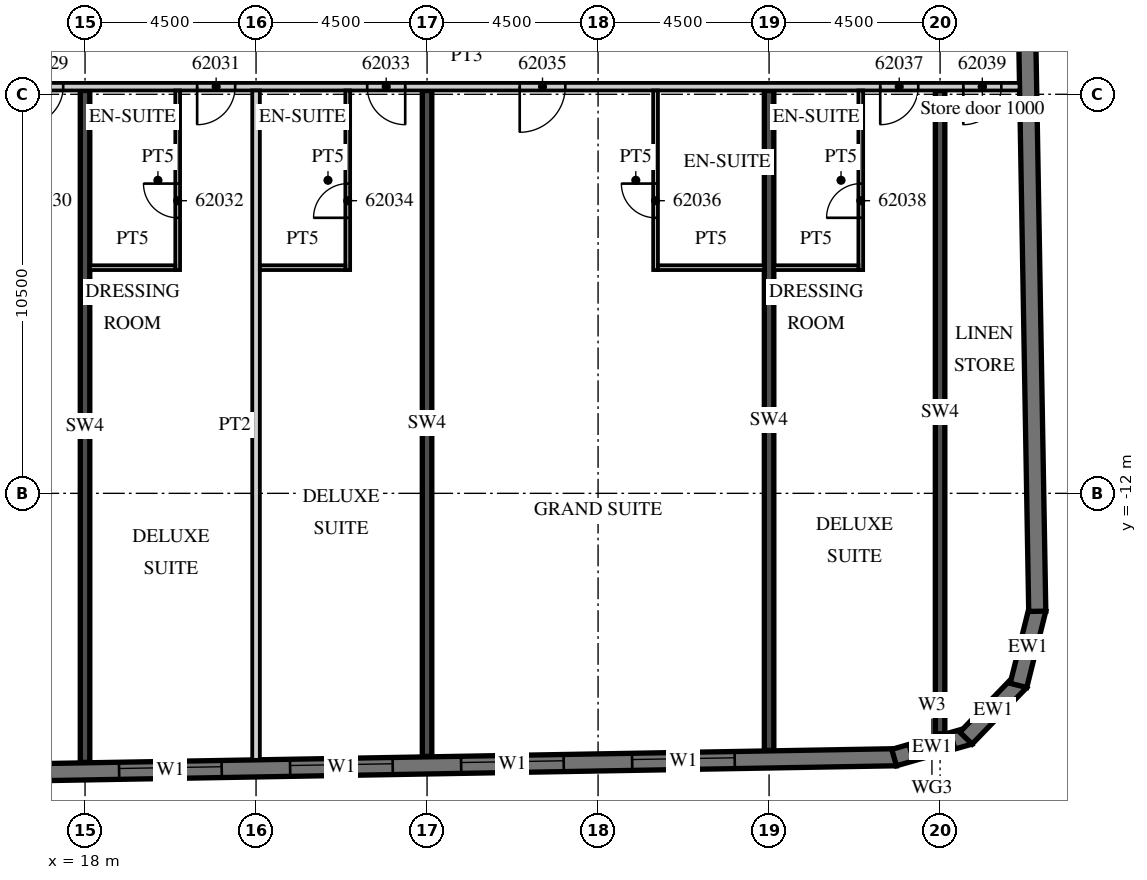
"""IFC4 building model, lengths in metres.
Left out: names, types, materials, properties, quantities, classifications, styles, units other than length and angle.
Written with IfcOpenShell. Run it as: python <this file> out.ifc"""

import sys

from ifc_helpers import new_model, si_unit, direction, frame, frame_2d, origin, place, context, subcontext, project, spatial, polyline, rectangle, outline, extrude, element, fill, save


model = new_model("IFC4")
c1 = context("Model", 3, precision=1e-05, world=origin(), true_north=direction((0.0, 1.0)))
c2 = subcontext(c1, "Body", "Model", "MODEL_VIEW")
j1 = project(units=[si_unit("LENGTHUNIT", "METRE"), si_unit("PLANEANGLEUNIT", "RADIAN")], contexts=[c1])
p1 = place(None, origin())
s1 = spatial("IfcSite", under=j1, at=p1, CompositionType="ELEMENT")
p2 = place(p1, origin())
s2 = spatial("IfcBuilding", under=s1, at=p2, CompositionType="ELEMENT")
p3 = place(p2, frame((0.0, 0.0, 250.7)))
s3 = spatial("IfcBuildingStorey", under=s2, at=p3, CompositionType="ELEMENT", Elevation=250.7)
p4 = place(p3, frame((18.0, -19.079, 0.0), z_axis=(0.0, 0.0, 1.0), x_axis=(0.0, 1.0, 0.0)))
e1 = element("IfcWall", 1, at=p4, inside=s3, PredefinedType="SHEAR", context=c2, shape_type="SweptSolid", body=[
    extrude(rectangle(XDim=17.679, YDim=0.25, at=frame_2d((8.84, 0.0))), origin(), (0.0, 0.0, 1.0), 3.3),
])
p5 = place(p3, frame((27.0, -18.922, 0.0), z_axis=(0.0, 0.0, 1.0), x_axis=(0.0, 1.0, 0.0)))
e2 = element("IfcWall", 2, at=p5, inside=s3, PredefinedType="SHEAR", context=c2, shape_type="SweptSolid", body=[
    extrude(rectangle(XDim=17.522, YDim=0.25, at=frame_2d((8.761, 0.0))), origin(), (0.0, 0.0, 1.0), 3.3),
])
p6 = place(p3, frame((36.0, -18.765, 0.0), z_axis=(0.0, 0.0, 1.0), x_axis=(0.0, 1.0, 0.0)))
e3 = element("IfcWall", 3, at=p6, inside=s3, PredefinedType="SHEAR", context=c2, shape_type="SweptSolid", body=[
    extrude(rectangle(XDim=17.365, YDim=0.25, at=frame_2d((8.683, 0.0))), origin(), (0.0, 0.0, 1.0), 3.3),
])
p7 = place(p3, frame((40.5, -18.325, 0.0), z_axis=(0.0, 0.0, 1.0), x_axis=(0.0, 1.0, 0.0)))
e4 = element("IfcWall", 4, at=p7, inside=s3, PredefinedType="SHEAR", context=c2, shape_type="SweptSolid", body=[
    extrude(rectangle(XDim=16.925, YDim=0.25, at=frame_2d((8.463, 0.0))), origin(), (0.0, 0.0, 1.0), 3.3),
])
p8 = place(p3, frame((-13.504, -19.866, 0.0), z_axis=(0.0, 0.0, 1.0), x_axis=(0.999847672978, 0.017453676992, 0.0)))
e5 = element("IfcWall", 5, at=p8, inside=s3, PredefinedType="SOLIDWALL", context=c2, shape_type="SweptSolid", body=[
    extrude(rectangle(XDim=52.86, YDim=0.45, at=frame_2d((26.43, 0.0))), origin(), (0.0, 0.0, 1.0), 3.02),
])
p9 = place(p8, frame((0.9, 0.0, 0.45)))
e6 = element("IfcOpeningElement", 6, at=p9, cuts=e5, PredefinedType="OPENING", context=c2, shape_type="SweptSolid", body=[
    extrude(rectangle(XDim=2.7, YDim=2.25, at=frame_2d((1.35, 1.125))), frame((0.0, 0.235, 0.0), z_axis=(0.0, -1.0, 0.0), x_axis=(1.0, 0.0, 0.0)), (0.0, 0.0, 1.0), 0.47),
])
p10 = place(p8, frame((5.401, 0.0, 0.45)))
e7 = element("IfcOpeningElement", 7, at=p10, cuts=e5, PredefinedType="OPENING", context=c2, shape_type="SweptSolid", body=[
    extrude(rectangle(XDim=2.7, YDim=2.25, at=frame_2d((1.35, 1.125))), frame((0.0, 0.235, 0.0), z_axis=(0.0, -1.0, 0.0), x_axis=(1.0, 0.0, 0.0)), (0.0, 0.0, 1.0), 0.47),
])
p11 = place(p8, frame((9.902, 0.0, 0.45)))
e8 = element("IfcOpeningElement", 8, at=p11, cuts=e5, PredefinedType="OPENING", context=c2, shape_type="SweptSolid", body=[
    extrude(rectangle(XDim=2.7, YDim=2.25, at=frame_2d((1.35, 1.125))), frame((0.0, 0.235, 0.0), z_axis=(0.0, -1.0, 0.0), x_axis=(1.0, 0.0, 0.0)), (0.0, 0.0, 1.0), 0.47),
])
p12 = place(p8, frame((14.402, 0.0, 0.45)))
e9 = element("IfcOpeningElement", 9, at=p12, cuts=e5, PredefinedType="OPENING", context=c2, shape_type="SweptSolid", body=[
    extrude(rectangle(XDim=2.7, YDim=2.25, at=frame_2d((1.35, 1.125))), frame((0.0, 0.235, 0.0), z_axis=(0.0, -1.0, 0.0), x_axis=(1.0, 0.0, 0.0)), (0.0, 0.0, 1.0), 0.47),
])
p13 = place(p8, frame((18.903, 0.0, 0.45)))
e10 = element("IfcOpeningElement", 10, at=p13, cuts=e5, PredefinedType="OPENING", context=c2, shape_type="SweptSolid", body=[
    extrude(rectangle(XDim=2.7, YDim=2.25, at=frame_2d((1.35, 1.125))), frame((0.0, 0.235, 0.0), z_axis=(0.0, -1.0, 0.0), x_axis=(1.0, 0.0, 0.0)), (0.0, 0.0, 1.0), 0.47),
])
p14 = place(p8, frame((23.404, 0.0, 0.45)))
e11 = element("IfcOpeningElement", 11, at=p14, cuts=e5, PredefinedType="OPENING", context=c2, shape_type="SweptSolid", body=[
    extrude(rectangle(XDim=2.7, YDim=2.25, at=frame_2d((1.35, 1.125))), frame((0.0, 0.235, 0.0), z_axis=(0.0, -1.0, 0.0), x_axis=(1.0, 0.0, 0.0)), (0.0, 0.0, 1.0), 0.47),
])
p15 = place(p8, frame((27.904, 0.0, 0.45)))
e12 = element("IfcOpeningElement", 12, at=p15, cuts=e5, PredefinedType="OPENING", context=c2, shape_type="SweptSolid", body=[
    extrude(rectangle(XDim=2.7, YDim=2.25, at=frame_2d((1.35, 1.125))), frame((0.0, 0.235, 0.0), z_axis=(0.0, -1.0, 0.0), x_axis=(1.0, 0.0, 0.0)), (0.0, 0.0, 1.0), 0.47),
])
p16 = place(p8, frame((32.405, 0.0, 0.45)))
e13 = element("IfcOpeningElement", 13, at=p16, cuts=e5, PredefinedType="OPENING", context=c2, shape_type="SweptSolid", body=[
    extrude(rectangle(XDim=2.7, YDim=2.25, at=frame_2d((1.35, 1.125))), frame((0.0, 0.235, 0.0), z_axis=(0.0, -1.0, 0.0), x_axis=(1.0, 0.0, 0.0)), (0.0, 0.0, 1.0), 0.47),
])
p17 = place(p8, frame((36.906, 0.0, 0.45)))
e14 = element("IfcOpeningElement", 14, at=p17, cuts=e5, PredefinedType="OPENING", context=c2, shape_type="SweptSolid", body=[
    extrude(rectangle(XDim=2.7, YDim=2.25, at=frame_2d((1.35, 1.125))), frame((0.0, 0.235, 0.0), z_axis=(0.0, -1.0, 0.0), x_axis=(1.0, 0.0, 0.0)), (0.0, 0.0, 1.0), 0.47),
])
p18 = place(p8, frame((41.406, 0.0, 0.45)))
e15 = element("IfcOpeningElement", 15, at=p18, cuts=e5, PredefinedType="OPENING", context=c2, shape_type="SweptSolid", body=[
    extrude(rectangle(XDim=2.7, YDim=2.25, at=frame_2d((1.35, 1.125))), frame((0.0, 0.235, 0.0), z_axis=(0.0, -1.0, 0.0), x_axis=(1.0, 0.0, 0.0)), (0.0, 0.0, 1.0), 0.47),
])
p19 = place(p8, frame((45.907, 0.0, 0.45)))
e16 = element("IfcOpeningElement", 16, at=p19, cuts=e5, PredefinedType="OPENING", context=c2, shape_type="SweptSolid", body=[
    extrude(rectangle(XDim=2.7, YDim=2.25, at=frame_2d((1.35, 1.125))), frame((0.0, 0.235, 0.0), z_axis=(0.0, -1.0, 0.0), x_axis=(1.0, 0.0, 0.0)), (0.0, 0.0, 1.0), 0.47),
])
p20 = place(p3, frame((39.29, -18.952, 0.0), z_axis=(0.0, 0.0, 1.0), x_axis=(0.961247584925, 0.275686562016, 0.0)))
e17 = element("IfcWall", 17, at=p20, inside=s3, PredefinedType="SOLIDWALL", context=c2, shape_type="SweptSolid", body=[
    extrude(outline(polyline([(0.0, -0.225), (2.071, -0.225), (1.95, 0.225), (0.121, 0.225), (0.0, -0.225)])), origin(), (0.0, 0.0, 1.0), 3.02),
])
p21 = place(p20, frame((0.435, 0.0, 0.45)))
e18 = element("IfcOpeningElement", 18, at=p21, cuts=e17, PredefinedType="OPENING", context=c2, shape_type="SweptSolid", body=[
    extrude(rectangle(XDim=1.2, YDim=2.25, at=frame_2d((0.6, 1.125))), frame((0.0, 0.235, 0.0), z_axis=(0.0, -1.0, 0.0), x_axis=(1.0, 0.0, 0.0)), (0.0, 0.0, 1.0), 0.47),
])
p22 = place(p3, frame((41.181, -18.442, 0.0), z_axis=(0.0, 0.0, 1.0), x_axis=(0.694678672846, 0.719320193998, 0.0)))
e19 = element("IfcWall", 19, at=p22, inside=s3, PredefinedType="SOLIDWALL", context=c2, shape_type="SweptSolid", body=[
    extrude(outline(polyline([(0.0, -0.225), (2.071, -0.225), (1.95, 0.225), (0.121, 0.225), (0.0, -0.225)])), origin(), (0.0, 0.0, 1.0), 3.02),
])
p23 = place(p3, frame((42.563, -17.054, 0.0), z_axis=(0.0, 0.0, 1.0), x_axis=(0.241841950319, 0.970315655375, 0.0)))
e20 = element("IfcWall", 20, at=p23, inside=s3, PredefinedType="SOLIDWALL", context=c2, shape_type="SweptSolid", body=[
    extrude(outline(polyline([(0.0, -0.225), (2.071, -0.225), (1.95, 0.225), (0.121, 0.225), (0.0, -0.225)])), origin(), (0.0, 0.0, 1.0), 3.02),
])
p24 = place(p3, frame((43.057, -15.103, 0.0), z_axis=(0.0, 0.0, 1.0), x_axis=(-0.017452408953, 0.999847695112, 0.0)))
e21 = element("IfcWall", 21, at=p24, inside=s3, PredefinedType="SOLIDWALL", context=c2, shape_type="SweptSolid", body=[
    extrude(rectangle(XDim=33.0, YDim=0.45, at=frame_2d((16.5, 0.0))), origin(), (0.0, 0.0, 1.0), 3.02),
])
p25 = place(p3, frame((13.5, -1.3, 0.0), z_axis=(0.0, 0.0, 1.0), x_axis=(1.0, 0.0, 0.0)))
e22 = element("IfcWall", 22, at=p25, inside=s3, PredefinedType="PARTITIONING", context=c2, shape_type="SweptSolid", body=[
    extrude(rectangle(XDim=29.091, YDim=0.2, at=frame_2d((14.545, 0.0))), origin(), (0.0, 0.0, 1.0), 3.02),
])
p26 = place(p25, frame((2.925, 0.0, 0.0)))
e23 = element("IfcOpeningElement", 23, at=p26, cuts=e22, PredefinedType="OPENING", context=c2, shape_type="SweptSolid", body=[
    extrude(rectangle(XDim=1.0, YDim=2.1, at=frame_2d((0.5, 1.05))), frame((0.0, 0.11, 0.0), z_axis=(0.0, -1.0, 0.0), x_axis=(1.0, 0.0, 0.0)), (0.0, 0.0, 1.0), 0.22),
])
p27 = place(p25, frame((7.45, 0.0, 0.0)))
e24 = element("IfcOpeningElement", 24, at=p27, cuts=e22, PredefinedType="OPENING", context=c2, shape_type="SweptSolid", body=[
    extrude(rectangle(XDim=1.0, YDim=2.1, at=frame_2d((0.5, 1.05))), frame((0.0, 0.11, 0.0), z_axis=(0.0, -1.0, 0.0), x_axis=(1.0, 0.0, 0.0)), (0.0, 0.0, 1.0), 0.22),
])
p28 = place(p25, frame((11.925, 0.0, 0.0)))
e25 = element("IfcOpeningElement", 25, at=p28, cuts=e22, PredefinedType="OPENING", context=c2, shape_type="SweptSolid", body=[
    extrude(rectangle(XDim=1.0, YDim=2.1, at=frame_2d((0.5, 1.05))), frame((0.0, 0.11, 0.0), z_axis=(0.0, -1.0, 0.0), x_axis=(1.0, 0.0, 0.0)), (0.0, 0.0, 1.0), 0.22),
])
p29 = place(p25, frame((15.938, 0.0, 0.0)))
e26 = element("IfcOpeningElement", 26, at=p29, cuts=e22, PredefinedType="OPENING", context=c2, shape_type="SweptSolid", body=[
    extrude(rectangle(XDim=1.2, YDim=2.1, at=frame_2d((0.6, 1.05))), frame((0.0, 0.11, 0.0), z_axis=(0.0, -1.0, 0.0), x_axis=(1.0, 0.0, 0.0)), (0.0, 0.0, 1.0), 0.22),
])
p30 = place(p25, frame((25.425, 0.0, 0.0)))
e27 = element("IfcOpeningElement", 27, at=p30, cuts=e22, PredefinedType="OPENING", context=c2, shape_type="SweptSolid", body=[
    extrude(rectangle(XDim=1.0, YDim=2.1, at=frame_2d((0.5, 1.05))), frame((0.0, 0.11, 0.0), z_axis=(0.0, -1.0, 0.0), x_axis=(1.0, 0.0, 0.0)), (0.0, 0.0, 1.0), 0.22),
])
p31 = place(p25, frame((27.611, 0.0, 0.0)))
e28 = element("IfcOpeningElement", 28, at=p31, cuts=e22, PredefinedType="OPENING", context=c2, shape_type="SweptSolid", body=[
    extrude(rectangle(XDim=1.0, YDim=2.4, at=frame_2d((0.5, 1.2))), frame((0.0, 0.11, 0.0), z_axis=(0.0, -1.0, 0.0), x_axis=(1.0, 0.0, 0.0)), (0.0, 0.0, 1.0), 0.22),
])
p32 = place(p3, frame((22.5, -19.013, 0.0), z_axis=(0.0, 0.0, 1.0), x_axis=(0.0, 1.0, 0.0)))
e29 = element("IfcWall", 29, at=p32, inside=s3, PredefinedType="PARTITIONING", context=c2, shape_type="SweptSolid", body=[
    extrude(rectangle(XDim=17.613, YDim=0.2, at=frame_2d((8.807, 0.0))), origin(), (0.0, 0.0, 1.0), 3.02),
])
p33 = place(p3, frame((20.438, -6.125, 0.0), z_axis=(0.0, 0.0, 1.0), x_axis=(0.0, 1.0, 0.0)))
e30 = element("IfcWall", 30, at=p33, inside=s3, PredefinedType="PARTITIONING", context=c2, shape_type="SweptSolid", body=[
    extrude(rectangle(XDim=4.725, YDim=0.125, at=frame_2d((2.363, 0.0))), origin(), (0.0, 0.0, 1.0), 3.02),
])
p34 = place(p33, frame((1.375, 0.0, 0.0)))
e31 = element("IfcOpeningElement", 31, at=p34, cuts=e30, PredefinedType="OPENING", context=c2, shape_type="SweptSolid", body=[
    extrude(rectangle(XDim=0.9, YDim=2.1, at=frame_2d((0.45, 1.05))), frame((0.0, 0.073, 0.0), z_axis=(0.0, -1.0, 0.0), x_axis=(1.0, 0.0, 0.0)), (0.0, 0.0, 1.0), 0.145),
])
p35 = place(p3, frame((18.125, -6.062, 0.0), z_axis=(0.0, 0.0, 1.0), x_axis=(1.0, 0.0, 0.0)))
e32 = element("IfcWall", 32, at=p35, inside=s3, PredefinedType="PARTITIONING", context=c2, shape_type="SweptSolid", body=[
    extrude(rectangle(XDim=2.25, YDim=0.125, at=frame_2d((1.125, 0.0))), origin(), (0.0, 0.0, 1.0), 3.02),
])
p36 = place(p3, frame((24.913, -6.125, 0.0), z_axis=(0.0, 0.0, 1.0), x_axis=(0.0, 1.0, 0.0)))
e33 = element("IfcWall", 33, at=p36, inside=s3, PredefinedType="PARTITIONING", context=c2, shape_type="SweptSolid", body=[
    extrude(rectangle(XDim=4.725, YDim=0.125, at=frame_2d((2.363, 0.0))), origin(), (0.0, 0.0, 1.0), 3.02),
])
p37 = place(p36, frame((1.375, 0.0, 0.0)))
e34 = element("IfcOpeningElement", 34, at=p37, cuts=e33, PredefinedType="OPENING", context=c2, shape_type="SweptSolid", body=[
    extrude(rectangle(XDim=0.9, YDim=2.1, at=frame_2d((0.45, 1.05))), frame((0.0, 0.073, 0.0), z_axis=(0.0, -1.0, 0.0), x_axis=(1.0, 0.0, 0.0)), (0.0, 0.0, 1.0), 0.145),
])
p38 = place(p3, frame((22.6, -6.062, 0.0), z_axis=(0.0, 0.0, 1.0), x_axis=(1.0, 0.0, 0.0)))
e35 = element("IfcWall", 35, at=p38, inside=s3, PredefinedType="PARTITIONING", context=c2, shape_type="SweptSolid", body=[
    extrude(rectangle(XDim=2.25, YDim=0.125, at=frame_2d((1.125, 0.0))), origin(), (0.0, 0.0, 1.0), 3.02),
])
p39 = place(p3, frame((33.013, -6.125, 0.0), z_axis=(0.0, 0.0, 1.0), x_axis=(0.0, 1.0, 0.0)))
e36 = element("IfcWall", 36, at=p39, inside=s3, PredefinedType="PARTITIONING", context=c2, shape_type="SweptSolid", body=[
    extrude(rectangle(XDim=4.725, YDim=0.125, at=frame_2d((2.363, 0.0))), origin(), (0.0, 0.0, 1.0), 3.02),
])
p40 = place(p39, frame((1.375, 0.0, 0.0)))
e37 = element("IfcOpeningElement", 37, at=p40, cuts=e36, PredefinedType="OPENING", context=c2, shape_type="SweptSolid", body=[
    extrude(rectangle(XDim=0.9, YDim=2.1, at=frame_2d((0.45, 1.05))), frame((0.0, 0.073, 0.0), z_axis=(0.0, -1.0, 0.0), x_axis=(1.0, 0.0, 0.0)), (0.0, 0.0, 1.0), 0.145),
])
p41 = place(p3, frame((33.075, -6.062, 0.0), z_axis=(0.0, 0.0, 1.0), x_axis=(1.0, 0.0, 0.0)))
e38 = element("IfcWall", 38, at=p41, inside=s3, PredefinedType="PARTITIONING", context=c2, shape_type="SweptSolid", body=[
    extrude(rectangle(XDim=2.8, YDim=0.125, at=frame_2d((1.4, 0.0))), origin(), (0.0, 0.0, 1.0), 3.02),
])
p42 = place(p3, frame((38.413, -6.125, 0.0), z_axis=(0.0, 0.0, 1.0), x_axis=(0.0, 1.0, 0.0)))
e39 = element("IfcWall", 39, at=p42, inside=s3, PredefinedType="PARTITIONING", context=c2, shape_type="SweptSolid", body=[
    extrude(rectangle(XDim=4.725, YDim=0.125, at=frame_2d((2.363, 0.0))), origin(), (0.0, 0.0, 1.0), 3.02),
])
p43 = place(p42, frame((1.375, 0.0, 0.0)))
e40 = element("IfcOpeningElement", 40, at=p43, cuts=e39, PredefinedType="OPENING", context=c2, shape_type="SweptSolid", body=[
    extrude(rectangle(XDim=0.9, YDim=2.1, at=frame_2d((0.45, 1.05))), frame((0.0, 0.073, 0.0), z_axis=(0.0, -1.0, 0.0), x_axis=(1.0, 0.0, 0.0)), (0.0, 0.0, 1.0), 0.145),
])
p44 = place(p3, frame((36.125, -6.062, 0.0), z_axis=(0.0, 0.0, 1.0), x_axis=(1.0, 0.0, 0.0)))
e41 = element("IfcWall", 41, at=p44, inside=s3, PredefinedType="PARTITIONING", context=c2, shape_type="SweptSolid", body=[
    extrude(rectangle(XDim=2.225, YDim=0.125, at=frame_2d((1.113, 0.0))), origin(), (0.0, 0.0, 1.0), 3.02),
])
p45 = place(p16, origin())
e42 = element("IfcWindow", 42, at=p45, inside=s3, PartitioningType="SINGLE_PANEL", PredefinedType="WINDOW", context=c2, shape_type="SweptSolid", body=[
    extrude(rectangle(XDim=2.7, YDim=2.25, at=frame_2d((1.35, 1.125))), frame((0.0, 0.09, 0.0), z_axis=(0.0, -1.0, 0.0), x_axis=(1.0, 0.0, 0.0)), (0.0, 0.0, 1.0), 0.06),
])
fill(e13, e42)
p46 = place(p17, origin())
e43 = element("IfcWindow", 43, at=p46, inside=s3, PartitioningType="SINGLE_PANEL", PredefinedType="WINDOW", context=c2, shape_type="SweptSolid", body=[
    extrude(rectangle(XDim=2.7, YDim=2.25, at=frame_2d((1.35, 1.125))), frame((0.0, 0.09, 0.0), z_axis=(0.0, -1.0, 0.0), x_axis=(1.0, 0.0, 0.0)), (0.0, 0.0, 1.0), 0.06),
])
fill(e14, e43)
p47 = place(p18, origin())
e44 = element("IfcWindow", 44, at=p47, inside=s3, PartitioningType="SINGLE_PANEL", PredefinedType="WINDOW", context=c2, shape_type="SweptSolid", body=[
    extrude(rectangle(XDim=2.7, YDim=2.25, at=frame_2d((1.35, 1.125))), frame((0.0, 0.09, 0.0), z_axis=(0.0, -1.0, 0.0), x_axis=(1.0, 0.0, 0.0)), (0.0, 0.0, 1.0), 0.06),
])
fill(e15, e44)
p48 = place(p19, origin())
e45 = element("IfcWindow", 45, at=p48, inside=s3, PartitioningType="SINGLE_PANEL", PredefinedType="WINDOW", context=c2, shape_type="SweptSolid", body=[
    extrude(rectangle(XDim=2.7, YDim=2.25, at=frame_2d((1.35, 1.125))), frame((0.0, 0.09, 0.0), z_axis=(0.0, -1.0, 0.0), x_axis=(1.0, 0.0, 0.0)), (0.0, 0.0, 1.0), 0.06),
])
fill(e16, e45)
p49 = place(p21, origin())
e46 = element("IfcWindow", 46, at=p49, inside=s3, PartitioningType="SINGLE_PANEL", PredefinedType="WINDOW", context=c2, shape_type="SweptSolid", body=[
    extrude(rectangle(XDim=1.2, YDim=2.25, at=frame_2d((0.6, 1.125))), frame((0.0, 0.09, 0.0), z_axis=(0.0, -1.0, 0.0), x_axis=(1.0, 0.0, 0.0)), (0.0, 0.0, 1.0), 0.06),
])
fill(e18, e46)
p50 = place(p26, origin())
e47 = element("IfcDoor", 47, at=p50, inside=s3, OperationType="SINGLE_SWING_LEFT", PredefinedType="DOOR", context=c2, shape_type="SweptSolid", body=[
    extrude(rectangle(XDim=1.0, YDim=2.1, at=frame_2d((0.5, 1.05))), frame((0.0, 0.025, 0.0), z_axis=(0.0, -1.0, 0.0), x_axis=(1.0, 0.0, 0.0)), (0.0, 0.0, 1.0), 0.05),
])
fill(e23, e47)
p51 = place(p27, origin())
e48 = element("IfcDoor", 48, at=p51, inside=s3, OperationType="SINGLE_SWING_LEFT", PredefinedType="DOOR", context=c2, shape_type="SweptSolid", body=[
    extrude(rectangle(XDim=1.0, YDim=2.1, at=frame_2d((0.5, 1.05))), frame((0.0, 0.025, 0.0), z_axis=(0.0, -1.0, 0.0), x_axis=(1.0, 0.0, 0.0)), (0.0, 0.0, 1.0), 0.05),
])
fill(e24, e48)
p52 = place(p34, origin())
e49 = element("IfcDoor", 49, at=p52, inside=s3, OperationType="SINGLE_SWING_RIGHT", PredefinedType="DOOR", context=c2, shape_type="SweptSolid", body=[
    extrude(rectangle(XDim=0.9, YDim=2.1, at=frame_2d((0.45, 1.05))), frame((0.0, 0.025, 0.0), z_axis=(0.0, -1.0, 0.0), x_axis=(1.0, 0.0, 0.0)), (0.0, 0.0, 1.0), 0.05),
])
fill(e31, e49)
p53 = place(p28, origin())
e50 = element("IfcDoor", 50, at=p53, inside=s3, OperationType="SINGLE_SWING_RIGHT", PredefinedType="DOOR", context=c2, shape_type="SweptSolid", body=[
    extrude(rectangle(XDim=1.0, YDim=2.1, at=frame_2d((0.5, 1.05))), frame((0.0, 0.025, 0.0), z_axis=(0.0, -1.0, 0.0), x_axis=(1.0, 0.0, 0.0)), (0.0, 0.0, 1.0), 0.05),
])
fill(e25, e50)
p54 = place(p37, origin())
e51 = element("IfcDoor", 51, at=p54, inside=s3, OperationType="SINGLE_SWING_LEFT", PredefinedType="DOOR", context=c2, shape_type="SweptSolid", body=[
    extrude(rectangle(XDim=0.9, YDim=2.1, at=frame_2d((0.45, 1.05))), frame((0.0, 0.025, 0.0), z_axis=(0.0, -1.0, 0.0), x_axis=(1.0, 0.0, 0.0)), (0.0, 0.0, 1.0), 0.05),
])
fill(e34, e51)
p55 = place(p29, origin())
e52 = element("IfcDoor", 52, at=p55, inside=s3, OperationType="SINGLE_SWING_LEFT", PredefinedType="DOOR", context=c2, shape_type="SweptSolid", body=[
    extrude(rectangle(XDim=1.2, YDim=2.1, at=frame_2d((0.6, 1.05))), frame((0.0, 0.025, 0.0), z_axis=(0.0, -1.0, 0.0), x_axis=(1.0, 0.0, 0.0)), (0.0, 0.0, 1.0), 0.05),
])
fill(e26, e52)
p56 = place(p40, origin())
e53 = element("IfcDoor", 53, at=p56, inside=s3, OperationType="SINGLE_SWING_RIGHT", PredefinedType="DOOR", context=c2, shape_type="SweptSolid", body=[
    extrude(rectangle(XDim=0.9, YDim=2.1, at=frame_2d((0.45, 1.05))), frame((0.0, 0.025, 0.0), z_axis=(0.0, -1.0, 0.0), x_axis=(1.0, 0.0, 0.0)), (0.0, 0.0, 1.0), 0.05),
])
fill(e37, e53)
p57 = place(p30, origin())
e54 = element("IfcDoor", 54, at=p57, inside=s3, OperationType="SINGLE_SWING_LEFT", PredefinedType="DOOR", context=c2, shape_type="SweptSolid", body=[
    extrude(rectangle(XDim=1.0, YDim=2.1, at=frame_2d((0.5, 1.05))), frame((0.0, 0.025, 0.0), z_axis=(0.0, -1.0, 0.0), x_axis=(1.0, 0.0, 0.0)), (0.0, 0.0, 1.0), 0.05),
])
fill(e27, e54)
p58 = place(p43, origin())
e55 = element("IfcDoor", 55, at=p58, inside=s3, OperationType="SINGLE_SWING_LEFT", PredefinedType="DOOR", context=c2, shape_type="SweptSolid", body=[
    extrude(rectangle(XDim=0.9, YDim=2.1, at=frame_2d((0.45, 1.05))), frame((0.0, 0.025, 0.0), z_axis=(0.0, -1.0, 0.0), x_axis=(1.0, 0.0, 0.0)), (0.0, 0.0, 1.0), 0.05),
])
fill(e40, e55)
p59 = place(p31, origin())
e56 = element("IfcDoor", 56, at=p59, inside=s3, OperationType="SINGLE_SWING_LEFT", PredefinedType="DOOR", context=c2, shape_type="SweptSolid", body=[
    extrude(rectangle(XDim=1.0, YDim=2.4, at=frame_2d((0.5, 1.2))), frame((0.0, 0.025, 0.0), z_axis=(0.0, -1.0, 0.0), x_axis=(1.0, 0.0, 0.0)), (0.0, 0.0, 1.0), 0.05),
])
fill(e28, e56)
save(model, sys.argv[1])
